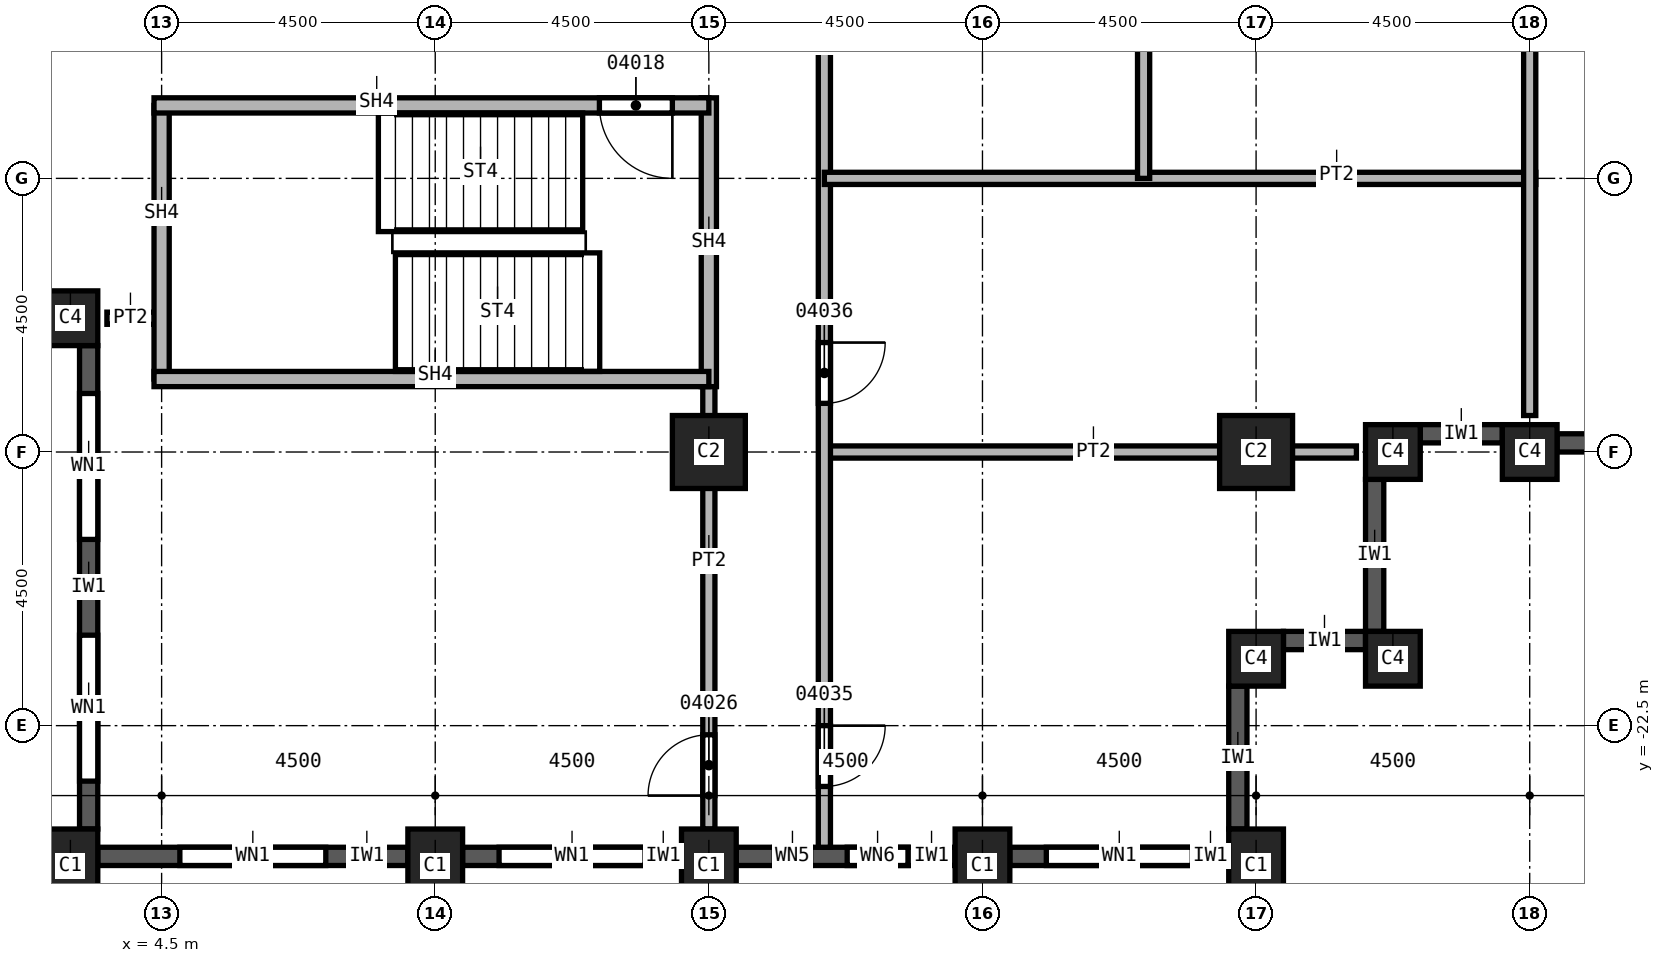
"""IFC4 building model, lengths in metres.
Left out: names, types, materials, properties, quantities, classifications, styles, units other than length and angle.
Written with IfcOpenShell. Run it as: python <this file> out.ifc"""

import sys

from ifc_helpers import new_model, si_unit, direction, frame, frame_2d, origin, origin_2d, place, context, subcontext, project, spatial, rectangle, extrude, element, fill, save


model = new_model("IFC4")
c1 = context("Model", 3, precision=1e-05, world=origin(), true_north=direction((0.0, 1.0)))
c2 = subcontext(c1, "Body", "Model", "MODEL_VIEW")
j1 = project(units=[si_unit("LENGTHUNIT", "METRE"), si_unit("PLANEANGLEUNIT", "RADIAN")], contexts=[c1])
p1 = place(None, origin())
s1 = spatial("IfcSite", under=j1, at=p1, CompositionType="ELEMENT")
p2 = place(p1, origin())
s2 = spatial("IfcBuilding", under=s1, at=p2, CompositionType="ELEMENT")
p3 = place(p2, frame((0.0, 0.0, 108.0)))
s3 = spatial("IfcBuildingStorey", under=s2, at=p3, CompositionType="ELEMENT", Elevation=108.0)
for number, where, z_axis, x_axis in (
    (1, (13.5, -18.0, 0.0), (0.0, 0.0, 1.0), (1.0, 0.0, 0.0)),
    (2, (22.5, -18.0, 0.0), (0.0, 0.0, 1.0), (1.0, 0.0, 0.0)),
):
    element("IfcColumn", number, at=place(p3, frame(where, z_axis=z_axis, x_axis=x_axis)), inside=s3, PredefinedType="COLUMN", context=c2, shape_type="SweptSolid", body=[
        extrude(rectangle(XDim=1.2, YDim=1.2, at=origin_2d()), origin(), (0.0, 0.0, 1.0), 3.7),
    ])
p4 = place(p3, frame((27.0, -18.0, 0.0), z_axis=(0.0, 0.0, 1.0), x_axis=(1.0, 0.0, 0.0)))
e3 = element("IfcColumn", 3, at=p4, inside=s3, PredefinedType="COLUMN", context=c2, shape_type="SweptSolid", body=[
    extrude(rectangle(XDim=0.9, YDim=0.9, at=origin_2d()), origin(), (0.0, 0.0, 1.0), 3.7),
])
for number, where, z_axis, x_axis in (
    (4, (3.0, -24.8, 0.0), (0.0, 0.0, 1.0), (1.0, 0.0, 0.0)),
    (5, (9.0, -24.8, 0.0), (0.0, 0.0, 1.0), (1.0, 0.0, 0.0)),
    (6, (13.5, -24.8, 0.0), (0.0, 0.0, 1.0), (1.0, 0.0, 0.0)),
    (7, (18.0, -24.8, 0.0), (0.0, 0.0, 1.0), (1.0, 0.0, 0.0)),
    (8, (22.5, -24.8, 0.0), (0.0, 0.0, 1.0), (1.0, 0.0, 0.0)),
):
    element("IfcColumn", number, at=place(p3, frame(where, z_axis=z_axis, x_axis=x_axis)), inside=s3, PredefinedType="COLUMN", context=c2, shape_type="SweptSolid", body=[
        extrude(rectangle(XDim=0.9, YDim=1.2, at=origin_2d()), origin(), (0.0, 0.0, 1.0), 3.7),
    ])
for number, where, z_axis, x_axis in (
    (9, (3.0, -15.8, 0.0), (0.0, 0.0, 1.0), (1.0, 0.0, 0.0)),
    (10, (22.5, -21.4, 0.0), (0.0, 0.0, 1.0), (1.0, 0.0, 0.0)),
    (11, (24.75, -21.4, 0.0), (0.0, 0.0, 1.0), (1.0, 0.0, 0.0)),
    (12, (24.75, -18.0, 0.0), (0.0, 0.0, 1.0), (1.0, 0.0, 0.0)),
):
    element("IfcColumn", number, at=place(p3, frame(where, z_axis=z_axis, x_axis=x_axis)), inside=s3, PredefinedType="COLUMN", context=c2, shape_type="SweptSolid", body=[
        extrude(rectangle(XDim=0.9, YDim=0.9, at=origin_2d()), origin(), (0.0, 0.0, 1.0), 3.7),
    ])
p5 = place(p3, frame((3.3, -16.25, 0.0), z_axis=(0.0, 0.0, 1.0), x_axis=(0.0, -1.0, 0.0)))
e13 = element("IfcWall", 13, at=p5, inside=s3, PredefinedType="SOLIDWALL", context=c2, shape_type="SweptSolid", body=[
    extrude(rectangle(XDim=7.95, YDim=0.3, at=frame_2d((3.975, 0.0))), origin(), (0.0, 0.0, 1.0), 3.1),
])
p6 = place(p5, frame((0.788, 0.0, 0.8)))
e14 = element("IfcOpeningElement", 14, at=p6, cuts=e13, PredefinedType="OPENING", context=c2, shape_type="SweptSolid", body=[
    extrude(rectangle(XDim=2.4, YDim=1.95, at=frame_2d((1.2, 0.975))), frame((0.0, 0.15, 0.0), z_axis=(0.0, -1.0, 0.0), x_axis=(1.0, 0.0, 0.0)), (0.0, 0.0, 1.0), 0.3),
])
p7 = place(p5, frame((4.762, 0.0, 0.8)))
e15 = element("IfcOpeningElement", 15, at=p7, cuts=e13, PredefinedType="OPENING", context=c2, shape_type="SweptSolid", body=[
    extrude(rectangle(XDim=2.4, YDim=1.95, at=frame_2d((1.2, 0.975))), frame((0.0, 0.15, 0.0), z_axis=(0.0, -1.0, 0.0), x_axis=(1.0, 0.0, 0.0)), (0.0, 0.0, 1.0), 0.3),
])
p8 = place(p3, frame((3.45, -24.65, 0.0), z_axis=(0.0, 0.0, 1.0), x_axis=(1.0, 0.0, 0.0)))
e16 = element("IfcWall", 16, at=p8, inside=s3, PredefinedType="SOLIDWALL", context=c2, shape_type="SweptSolid", body=[
    extrude(rectangle(XDim=5.1, YDim=0.3, at=frame_2d((2.55, 0.0))), origin(), (0.0, 0.0, 1.0), 3.1),
])
p9 = place(p8, frame((1.35, 0.0, 0.8)))
e17 = element("IfcOpeningElement", 17, at=p9, cuts=e16, PredefinedType="OPENING", context=c2, shape_type="SweptSolid", body=[
    extrude(rectangle(XDim=2.4, YDim=1.95, at=frame_2d((1.2, 0.975))), frame((0.0, 0.15, 0.0), z_axis=(0.0, -1.0, 0.0), x_axis=(1.0, 0.0, 0.0)), (0.0, 0.0, 1.0), 0.3),
])
p10 = place(p3, frame((9.45, -24.65, 0.0), z_axis=(0.0, 0.0, 1.0), x_axis=(1.0, 0.0, 0.0)))
e18 = element("IfcWall", 18, at=p10, inside=s3, PredefinedType="SOLIDWALL", context=c2, shape_type="SweptSolid", body=[
    extrude(rectangle(XDim=3.6, YDim=0.3, at=frame_2d((1.8, 0.0))), origin(), (0.0, 0.0, 1.0), 3.1),
])
p11 = place(p10, frame((0.6, 0.0, 0.8)))
e19 = element("IfcOpeningElement", 19, at=p11, cuts=e18, PredefinedType="OPENING", context=c2, shape_type="SweptSolid", body=[
    extrude(rectangle(XDim=2.4, YDim=1.95, at=frame_2d((1.2, 0.975))), frame((0.0, 0.15, 0.0), z_axis=(0.0, -1.0, 0.0), x_axis=(1.0, 0.0, 0.0)), (0.0, 0.0, 1.0), 0.3),
])
p12 = place(p3, frame((13.95, -24.65, 0.0), z_axis=(0.0, 0.0, 1.0), x_axis=(1.0, 0.0, 0.0)))
e20 = element("IfcWall", 20, at=p12, inside=s3, PredefinedType="SOLIDWALL", context=c2, shape_type="SweptSolid", body=[
    extrude(rectangle(XDim=3.6, YDim=0.3, at=frame_2d((1.8, 0.0))), origin(), (0.0, 0.0, 1.0), 3.1),
])
p13 = place(p12, frame((0.625, 0.0, 0.8)))
e21 = element("IfcOpeningElement", 21, at=p13, cuts=e20, PredefinedType="OPENING", context=c2, shape_type="SweptSolid", body=[
    extrude(rectangle(XDim=0.6, YDim=1.95, at=frame_2d((0.3, 0.975))), frame((0.0, 0.15, 0.0), z_axis=(0.0, -1.0, 0.0), x_axis=(1.0, 0.0, 0.0)), (0.0, 0.0, 1.0), 0.3),
])
p14 = place(p12, frame((1.825, 0.0, 0.8)))
e22 = element("IfcOpeningElement", 22, at=p14, cuts=e20, PredefinedType="OPENING", context=c2, shape_type="SweptSolid", body=[
    extrude(rectangle(XDim=1.0, YDim=1.95, at=frame_2d((0.5, 0.975))), frame((0.0, 0.15, 0.0), z_axis=(0.0, -1.0, 0.0), x_axis=(1.0, 0.0, 0.0)), (0.0, 0.0, 1.0), 0.3),
])
p15 = place(p3, frame((18.45, -24.65, 0.0), z_axis=(0.0, 0.0, 1.0), x_axis=(1.0, 0.0, 0.0)))
e23 = element("IfcWall", 23, at=p15, inside=s3, PredefinedType="SOLIDWALL", context=c2, shape_type="SweptSolid", body=[
    extrude(rectangle(XDim=3.6, YDim=0.3, at=frame_2d((1.8, 0.0))), origin(), (0.0, 0.0, 1.0), 3.1),
])
p16 = place(p15, frame((0.6, 0.0, 0.8)))
e24 = element("IfcOpeningElement", 24, at=p16, cuts=e23, PredefinedType="OPENING", context=c2, shape_type="SweptSolid", body=[
    extrude(rectangle(XDim=2.4, YDim=1.95, at=frame_2d((1.2, 0.975))), frame((0.0, 0.15, 0.0), z_axis=(0.0, -1.0, 0.0), x_axis=(1.0, 0.0, 0.0)), (0.0, 0.0, 1.0), 0.3),
])
p17 = place(p3, frame((22.2, -24.2, 0.0), z_axis=(0.0, 0.0, 1.0), x_axis=(0.0, 1.0, 0.0)))
e25 = element("IfcWall", 25, at=p17, inside=s3, PredefinedType="SOLIDWALL", context=c2, shape_type="SweptSolid", body=[
    extrude(rectangle(XDim=2.35, YDim=0.3, at=frame_2d((1.175, 0.0))), origin(), (0.0, 0.0, 1.0), 3.1),
])
p18 = place(p3, frame((22.95, -21.1, 0.0), z_axis=(0.0, 0.0, 1.0), x_axis=(1.0, 0.0, 0.0)))
e26 = element("IfcWall", 26, at=p18, inside=s3, PredefinedType="SOLIDWALL", context=c2, shape_type="SweptSolid", body=[
    extrude(rectangle(XDim=1.35, YDim=0.3, at=frame_2d((0.675, 0.0))), origin(), (0.0, 0.0, 1.0), 3.1),
])
p19 = place(p3, frame((24.45, -20.95, 0.0), z_axis=(0.0, 0.0, 1.0), x_axis=(0.0, 1.0, 0.0)))
e27 = element("IfcWall", 27, at=p19, inside=s3, PredefinedType="SOLIDWALL", context=c2, shape_type="SweptSolid", body=[
    extrude(rectangle(XDim=2.5, YDim=0.3, at=frame_2d((1.25, 0.0))), origin(), (0.0, 0.0, 1.0), 3.1),
])
p20 = place(p3, frame((25.2, -17.7, 0.0), z_axis=(0.0, 0.0, 1.0), x_axis=(1.0, 0.0, 0.0)))
e28 = element("IfcWall", 28, at=p20, inside=s3, PredefinedType="SOLIDWALL", context=c2, shape_type="SweptSolid", body=[
    extrude(rectangle(XDim=1.35, YDim=0.3, at=frame_2d((0.675, 0.0))), origin(), (0.0, 0.0, 1.0), 3.1),
])
p21 = place(p3, frame((27.45, -17.85, 0.0), z_axis=(0.0, 0.0, 1.0), x_axis=(1.0, 0.0, 0.0)))
e29 = element("IfcWall", 29, at=p21, inside=s3, PredefinedType="SOLIDWALL", context=c2, shape_type="SweptSolid", body=[
    extrude(rectangle(XDim=3.6, YDim=0.3, at=frame_2d((1.8, 0.0))), origin(), (0.0, 0.0, 1.0), 3.1),
])
p22 = place(p21, frame((0.6, 0.0, 0.8)))
e30 = element("IfcOpeningElement", 30, at=p22, cuts=e29, PredefinedType="OPENING", context=c2, shape_type="SweptSolid", body=[
    extrude(rectangle(XDim=2.4, YDim=1.95, at=frame_2d((1.2, 0.975))), frame((0.0, 0.15, 0.0), z_axis=(0.0, -1.0, 0.0), x_axis=(1.0, 0.0, 0.0)), (0.0, 0.0, 1.0), 0.3),
])
p23 = place(p3, frame((4.5, -15.8, 0.0), z_axis=(0.0, 0.0, 1.0), x_axis=(-1.0, 0.0, 0.0)))
e31 = element("IfcWall", 31, at=p23, inside=s3, PredefinedType="PARTITIONING", context=c2, shape_type="SweptSolid", body=[
    extrude(rectangle(XDim=0.9, YDim=0.2, at=frame_2d((0.45, 0.0))), origin(), (0.0, 0.0, 1.0), 3.7),
])
p24 = place(p3, frame((13.5, -24.2, 0.0), z_axis=(0.0, 0.0, 1.0), x_axis=(0.0, 1.0, 0.0)))
e32 = element("IfcWall", 32, at=p24, inside=s3, PredefinedType="PARTITIONING", context=c2, shape_type="SweptSolid", body=[
    extrude(rectangle(XDim=7.525, YDim=0.2, at=frame_2d((3.762, 0.0))), origin(), (0.0, 0.0, 1.0), 3.7),
])
p25 = place(p24, frame((0.55, 0.0, 0.0)))
e33 = element("IfcOpeningElement", 33, at=p25, cuts=e32, PredefinedType="OPENING", context=c2, shape_type="SweptSolid", body=[
    extrude(rectangle(XDim=1.0, YDim=2.1, at=frame_2d((0.5, 1.05))), frame((0.0, 0.1, 0.0), z_axis=(0.0, -1.0, 0.0), x_axis=(1.0, 0.0, 0.0)), (0.0, 0.0, 1.0), 0.2),
])
p26 = place(p3, frame((15.4, -18.0, 0.0), z_axis=(0.0, 0.0, 1.0), x_axis=(1.0, 0.0, 0.0)))
e34 = element("IfcWall", 34, at=p26, inside=s3, PredefinedType="PARTITIONING", context=c2, shape_type="SweptSolid", body=[
    extrude(rectangle(XDim=8.75, YDim=0.2, at=frame_2d((4.375, 0.0))), origin(), (0.0, 0.0, 1.0), 3.7),
])
p27 = place(p3, frame((15.4, -3.65, 0.0), z_axis=(0.0, 0.0, 1.0), x_axis=(0.0, -1.0, 0.0)))
e35 = element("IfcWall", 35, at=p27, inside=s3, PredefinedType="PARTITIONING", context=c2, shape_type="SweptSolid", body=[
    extrude(rectangle(XDim=20.85, YDim=0.2, at=frame_2d((10.425, 0.0))), origin(), (0.0, 0.0, 1.0), 3.7),
])
p28 = place(p27, frame((18.85, 0.0, 0.0)))
e36 = element("IfcOpeningElement", 36, at=p28, cuts=e35, PredefinedType="OPENING", context=c2, shape_type="SweptSolid", body=[
    extrude(rectangle(XDim=1.0, YDim=2.1, at=frame_2d((0.5, 1.05))), frame((0.0, 0.1, 0.0), z_axis=(0.0, -1.0, 0.0), x_axis=(1.0, 0.0, 0.0)), (0.0, 0.0, 1.0), 0.2),
])
p29 = place(p27, frame((12.55, 0.0, 0.0)))
e37 = element("IfcOpeningElement", 37, at=p29, cuts=e35, PredefinedType="OPENING", context=c2, shape_type="SweptSolid", body=[
    extrude(rectangle(XDim=1.0, YDim=2.1, at=frame_2d((0.5, 1.05))), frame((0.0, 0.1, 0.0), z_axis=(0.0, -1.0, 0.0), x_axis=(1.0, 0.0, 0.0)), (0.0, 0.0, 1.0), 0.2),
])
p30 = place(p27, frame((4.45, 0.0, 0.0)))
e38 = element("IfcOpeningElement", 38, at=p30, cuts=e35, PredefinedType="OPENING", context=c2, shape_type="SweptSolid", body=[
    extrude(rectangle(XDim=1.0, YDim=2.1, at=frame_2d((0.5, 1.05))), frame((0.0, 0.1, 0.0), z_axis=(0.0, -1.0, 0.0), x_axis=(1.0, 0.0, 0.0)), (0.0, 0.0, 1.0), 0.2),
])
p31 = place(p3, frame((15.4, -13.5, 0.0), z_axis=(0.0, 0.0, 1.0), x_axis=(1.0, 0.0, 0.0)))
e39 = element("IfcWall", 39, at=p31, inside=s3, PredefinedType="PARTITIONING", context=c2, shape_type="SweptSolid", body=[
    extrude(rectangle(XDim=11.7, YDim=0.2, at=frame_2d((5.85, 0.0))), origin(), (0.0, 0.0, 1.0), 3.7),
])
p32 = place(p3, frame((20.65, -3.75, 0.0), z_axis=(0.0, 0.0, 1.0), x_axis=(0.0, -1.0, 0.0)))
e40 = element("IfcWall", 40, at=p32, inside=s3, PredefinedType="PARTITIONING", context=c2, shape_type="SweptSolid", body=[
    extrude(rectangle(XDim=9.75, YDim=0.2, at=frame_2d((4.875, 0.0))), origin(), (0.0, 0.0, 1.0), 3.7),
])
p33 = place(p32, frame((3.4, 0.0, 0.0)))
e41 = element("IfcOpeningElement", 41, at=p33, cuts=e40, PredefinedType="OPENING", context=c2, shape_type="SweptSolid", body=[
    extrude(rectangle(XDim=1.0, YDim=2.1, at=frame_2d((0.5, 1.05))), frame((0.0, 0.1, 0.0), z_axis=(0.0, -1.0, 0.0), x_axis=(1.0, 0.0, 0.0)), (0.0, 0.0, 1.0), 0.2),
])
p34 = place(p3, frame((27.0, -3.75, 0.0), z_axis=(0.0, 0.0, 1.0), x_axis=(0.0, -1.0, 0.0)))
e42 = element("IfcWall", 42, at=p34, inside=s3, PredefinedType="PARTITIONING", context=c2, shape_type="SweptSolid", body=[
    extrude(rectangle(XDim=13.65, YDim=0.2, at=frame_2d((6.825, 0.0))), origin(), (0.0, 0.0, 1.0), 3.7),
])
p35 = place(p3, frame((4.5, -16.8, 0.0), z_axis=(0.0, 0.0, 1.0), x_axis=(0.0, 1.0, 0.0)))
e43 = element("IfcWall", 43, at=p35, inside=s3, PredefinedType="SOLIDWALL", context=c2, shape_type="SweptSolid", body=[
    extrude(rectangle(XDim=4.5, YDim=0.25, at=frame_2d((2.25, 0.0))), origin(), (0.0, 0.0, 1.0), 3.7),
])
p36 = place(p3, frame((13.5, -16.925, 0.0), z_axis=(0.0, 0.0, 1.0), x_axis=(0.0, 1.0, 0.0)))
e44 = element("IfcWall", 44, at=p36, inside=s3, PredefinedType="SOLIDWALL", context=c2, shape_type="SweptSolid", body=[
    extrude(rectangle(XDim=4.75, YDim=0.25, at=frame_2d((2.375, 0.0))), origin(), (0.0, 0.0, 1.0), 3.7),
])
p37 = place(p3, frame((13.5, -16.8, 0.0), z_axis=(0.0, 0.0, 1.0), x_axis=(-1.0, 0.0, 0.0)))
e45 = element("IfcWall", 45, at=p37, inside=s3, PredefinedType="SOLIDWALL", context=c2, shape_type="SweptSolid", body=[
    extrude(rectangle(XDim=9.125, YDim=0.25, at=frame_2d((4.562, 0.0))), origin(), (0.0, 0.0, 1.0), 3.7),
])
p38 = place(p3, frame((13.5, -12.3, 0.0), z_axis=(0.0, 0.0, 1.0), x_axis=(-1.0, 0.0, 0.0)))
e46 = element("IfcWall", 46, at=p38, inside=s3, PredefinedType="SOLIDWALL", context=c2, shape_type="SweptSolid", body=[
    extrude(rectangle(XDim=9.125, YDim=0.25, at=frame_2d((4.562, 0.0))), origin(), (0.0, 0.0, 1.0), 3.7),
])
p39 = place(p38, frame((0.6, 0.0, 0.0)))
e47 = element("IfcOpeningElement", 47, at=p39, cuts=e46, PredefinedType="OPENING", context=c2, shape_type="SweptSolid", body=[
    extrude(rectangle(XDim=1.2, YDim=2.1, at=frame_2d((0.6, 1.05))), frame((0.0, 0.125, 0.0), z_axis=(0.0, -1.0, 0.0), x_axis=(1.0, 0.0, 0.0)), (0.0, 0.0, 1.0), 0.25),
])
p40 = place(p6, origin())
e48 = element("IfcWindow", 48, at=p40, inside=s3, PartitioningType="SINGLE_PANEL", PredefinedType="WINDOW", context=c2, shape_type="SweptSolid", body=[
    extrude(rectangle(XDim=2.4, YDim=1.95, at=frame_2d((1.2, 0.975))), frame((0.0, 0.03, 0.0), z_axis=(0.0, -1.0, 0.0), x_axis=(1.0, 0.0, 0.0)), (0.0, 0.0, 1.0), 0.06),
])
fill(e14, e48)
p41 = place(p7, origin())
e49 = element("IfcWindow", 49, at=p41, inside=s3, PartitioningType="SINGLE_PANEL", PredefinedType="WINDOW", context=c2, shape_type="SweptSolid", body=[
    extrude(rectangle(XDim=2.4, YDim=1.95, at=frame_2d((1.2, 0.975))), frame((0.0, 0.03, 0.0), z_axis=(0.0, -1.0, 0.0), x_axis=(1.0, 0.0, 0.0)), (0.0, 0.0, 1.0), 0.06),
])
fill(e15, e49)
p42 = place(p9, origin())
e50 = element("IfcWindow", 50, at=p42, inside=s3, PartitioningType="SINGLE_PANEL", PredefinedType="WINDOW", context=c2, shape_type="SweptSolid", body=[
    extrude(rectangle(XDim=2.4, YDim=1.95, at=frame_2d((1.2, 0.975))), frame((0.0, 0.03, 0.0), z_axis=(0.0, -1.0, 0.0), x_axis=(1.0, 0.0, 0.0)), (0.0, 0.0, 1.0), 0.06),
])
fill(e17, e50)
p43 = place(p11, origin())
e51 = element("IfcWindow", 51, at=p43, inside=s3, PartitioningType="SINGLE_PANEL", PredefinedType="WINDOW", context=c2, shape_type="SweptSolid", body=[
    extrude(rectangle(XDim=2.4, YDim=1.95, at=frame_2d((1.2, 0.975))), frame((0.0, 0.03, 0.0), z_axis=(0.0, -1.0, 0.0), x_axis=(1.0, 0.0, 0.0)), (0.0, 0.0, 1.0), 0.06),
])
fill(e19, e51)
p44 = place(p16, origin())
e52 = element("IfcWindow", 52, at=p44, inside=s3, PartitioningType="SINGLE_PANEL", PredefinedType="WINDOW", context=c2, shape_type="SweptSolid", body=[
    extrude(rectangle(XDim=2.4, YDim=1.95, at=frame_2d((1.2, 0.975))), frame((0.0, 0.03, 0.0), z_axis=(0.0, -1.0, 0.0), x_axis=(1.0, 0.0, 0.0)), (0.0, 0.0, 1.0), 0.06),
])
fill(e24, e52)
p45 = place(p39, origin())
e53 = element("IfcDoor", 53, at=p45, inside=s3, OperationType="SINGLE_SWING_LEFT", PredefinedType="DOOR", context=c2, shape_type="SweptSolid", body=[
    extrude(rectangle(XDim=1.2, YDim=2.1, at=frame_2d((0.6, 1.05))), frame((0.0, 0.025, 0.0), z_axis=(0.0, -1.0, 0.0), x_axis=(1.0, 0.0, 0.0)), (0.0, 0.0, 1.0), 0.05),
])
fill(e47, e53)
p46 = place(p25, origin())
e54 = element("IfcDoor", 54, at=p46, inside=s3, OperationType="SINGLE_SWING_LEFT", PredefinedType="DOOR", context=c2, shape_type="SweptSolid", body=[
    extrude(rectangle(XDim=1.0, YDim=2.1, at=frame_2d((0.5, 1.05))), frame((0.0, 0.025, 0.0), z_axis=(0.0, -1.0, 0.0), x_axis=(1.0, 0.0, 0.0)), (0.0, 0.0, 1.0), 0.05),
])
fill(e33, e54)
p47 = place(p28, origin())
e55 = element("IfcDoor", 55, at=p47, inside=s3, OperationType="SINGLE_SWING_RIGHT", PredefinedType="DOOR", context=c2, shape_type="SweptSolid", body=[
    extrude(rectangle(XDim=1.0, YDim=2.1, at=frame_2d((0.5, 1.05))), frame((0.0, 0.025, 0.0), z_axis=(0.0, -1.0, 0.0), x_axis=(1.0, 0.0, 0.0)), (0.0, 0.0, 1.0), 0.05),
])
fill(e36, e55)
p48 = place(p29, origin())
e56 = element("IfcDoor", 56, at=p48, inside=s3, OperationType="SINGLE_SWING_LEFT", PredefinedType="DOOR", context=c2, shape_type="SweptSolid", body=[
    extrude(rectangle(XDim=1.0, YDim=2.1, at=frame_2d((0.5, 1.05))), frame((0.0, 0.025, 0.0), z_axis=(0.0, -1.0, 0.0), x_axis=(1.0, 0.0, 0.0)), (0.0, 0.0, 1.0), 0.05),
])
fill(e37, e56)
p49 = place(p13, origin())
e57 = element("IfcWindow", 57, at=p49, inside=s3, PartitioningType="SINGLE_PANEL", PredefinedType="WINDOW", context=c2, shape_type="SweptSolid", body=[
    extrude(rectangle(XDim=0.6, YDim=1.95, at=frame_2d((0.3, 0.975))), frame((0.0, 0.03, 0.0), z_axis=(0.0, -1.0, 0.0), x_axis=(1.0, 0.0, 0.0)), (0.0, 0.0, 1.0), 0.06),
])
fill(e21, e57)
p50 = place(p14, origin())
e58 = element("IfcWindow", 58, at=p50, inside=s3, PartitioningType="SINGLE_PANEL", PredefinedType="WINDOW", context=c2, shape_type="SweptSolid", body=[
    extrude(rectangle(XDim=1.0, YDim=1.95, at=frame_2d((0.5, 0.975))), frame((0.0, 0.03, 0.0), z_axis=(0.0, -1.0, 0.0), x_axis=(1.0, 0.0, 0.0)), (0.0, 0.0, 1.0), 0.06),
])
fill(e22, e58)
save(model, sys.argv[1])
